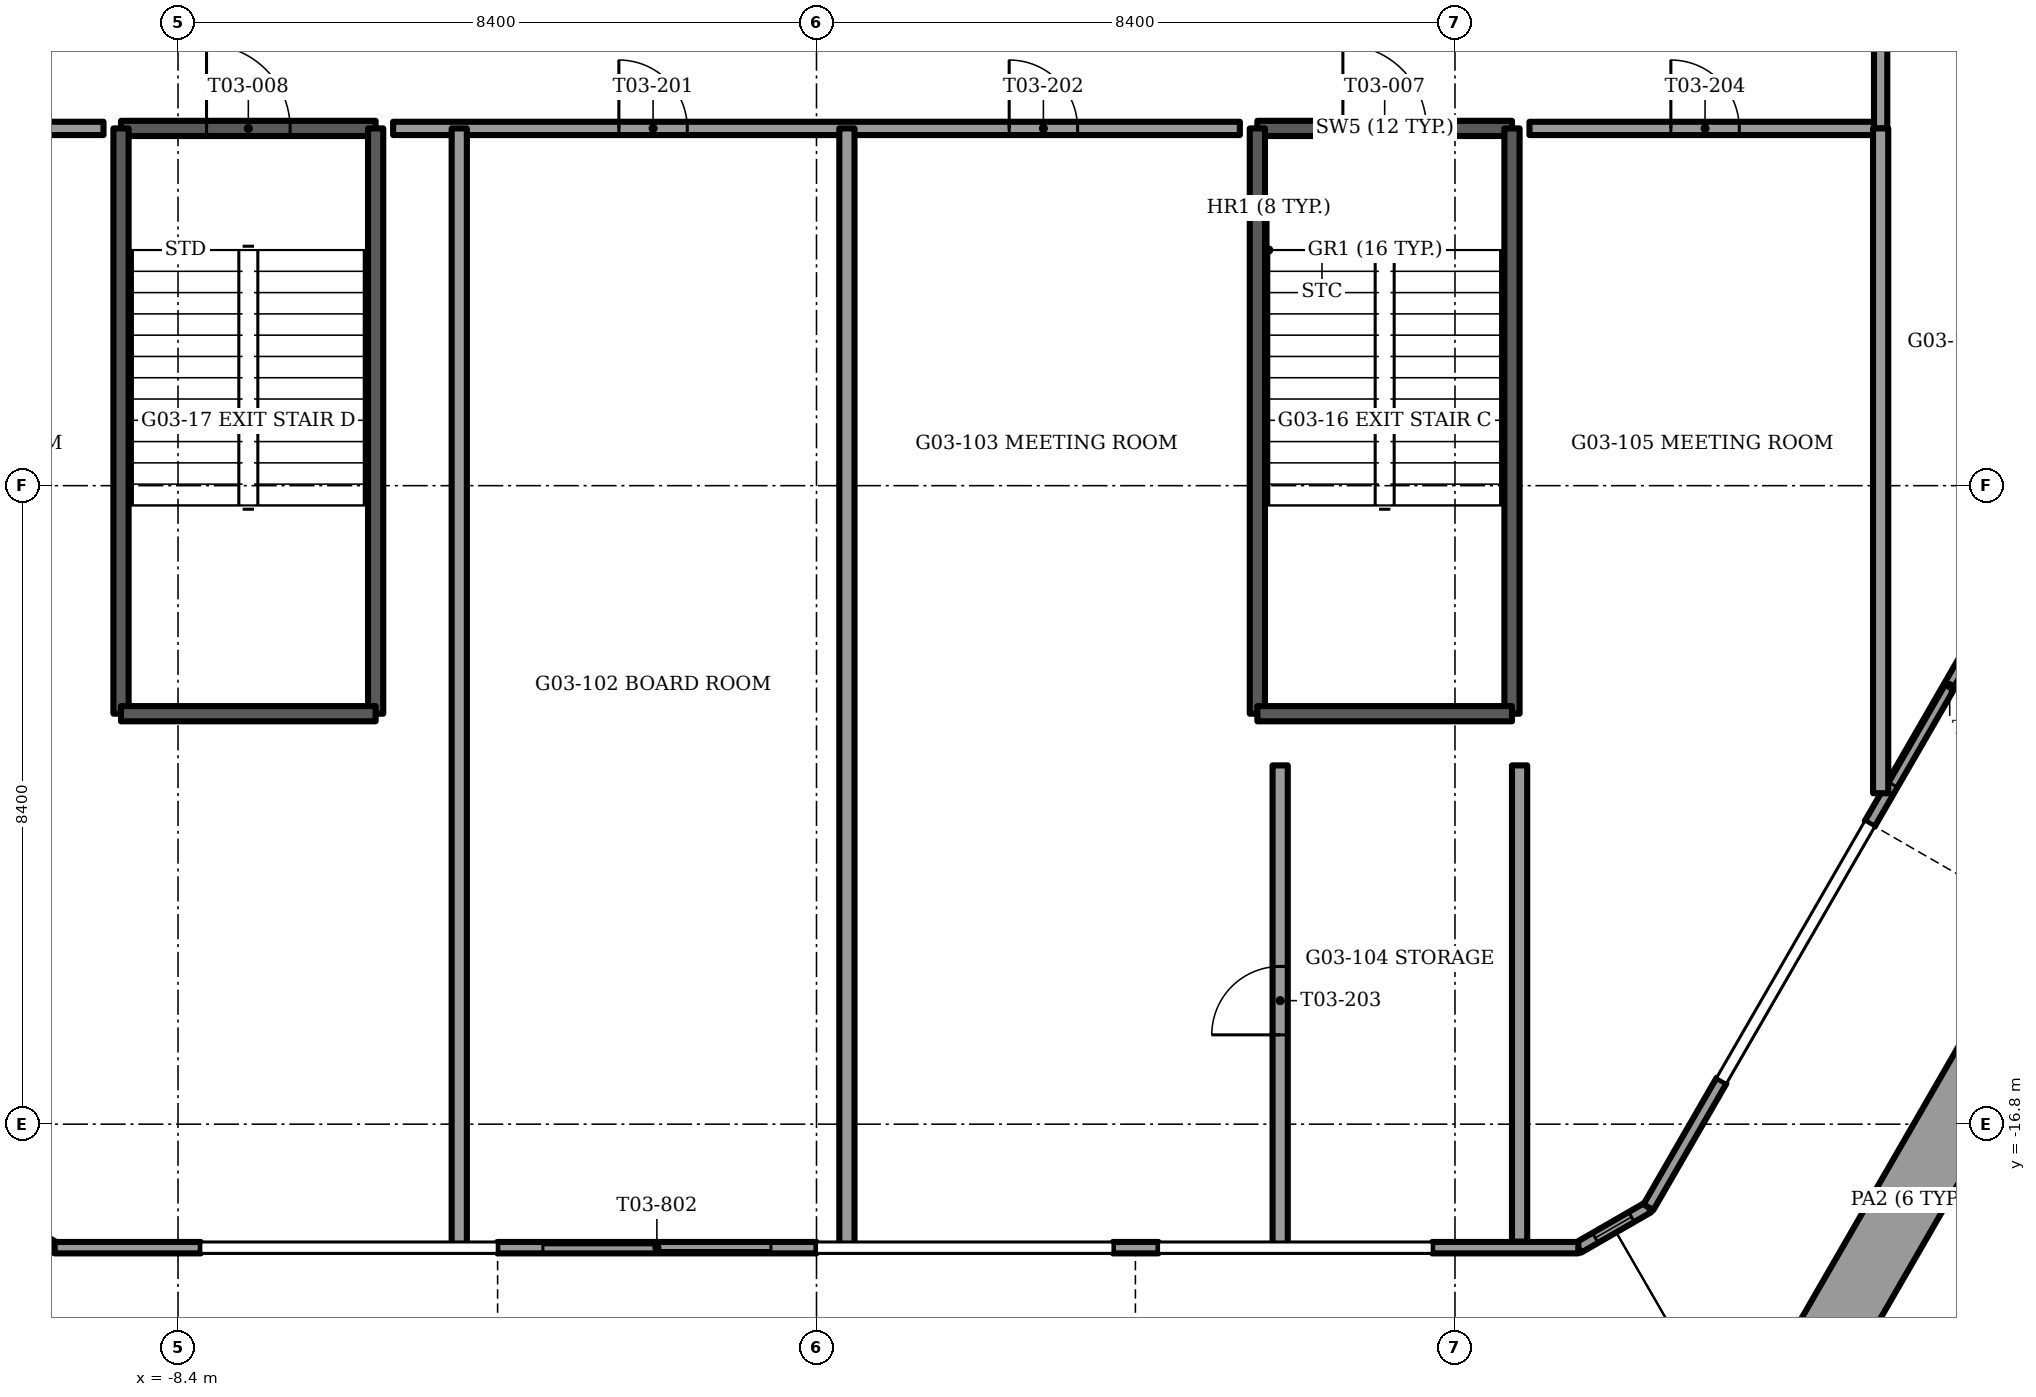
"""IFC4 building model, lengths in metres.
Left out: names, types, materials, properties, quantities, classifications, styles, units other than length and angle.
Written with IfcOpenShell. Run it as: python <this file> out.ifc"""

import sys

from ifc_helpers import new_model, si_unit, direction, frame, frame_2d, origin, place, context, subcontext, project, spatial, rectangle, extrude, element, fill, save


model = new_model("IFC4")
c1 = context("Model", 3, precision=1e-05, world=origin(), true_north=direction((0.0, 1.0)))
c2 = subcontext(c1, "Body", "Model", "MODEL_VIEW")
j1 = project(units=[si_unit("LENGTHUNIT", "METRE"), si_unit("PLANEANGLEUNIT", "RADIAN")], contexts=[c1])
p1 = place(None, origin())
s1 = spatial("IfcSite", under=j1, at=p1, CompositionType="ELEMENT")
p2 = place(p1, origin())
s2 = spatial("IfcBuilding", under=s1, at=p2, CompositionType="ELEMENT")
p3 = place(p2, frame((0.0, 0.0, 14.5)))
s3 = spatial("IfcBuildingStorey", under=s2, at=p3, CompositionType="ELEMENT", Elevation=14.5)
p4 = place(p3, frame((12.705, -20.694, 0.0), z_axis=(0.0, 0.0, 1.0), x_axis=(0.500005133765, 0.866022439784, 0.0)))
e1 = element("IfcWall", 1, at=p4, inside=s3, PredefinedType="PARAPET", context=c2, shape_type="SweptSolid", body=[
    extrude(rectangle(XDim=6.704, YDim=0.9, at=frame_2d((3.352, 0.0))), origin(), (0.0, 0.0, 1.0), 1.1),
])
p5 = place(p3, frame((-4.2, -18.425, 0.0), z_axis=(0.0, 0.0, 1.0), x_axis=(1.0, 0.0, 0.0)))
e2 = element("IfcWall", 2, at=p5, inside=s3, PredefinedType="SOLIDWALL", context=c2, shape_type="SweptSolid", body=[
    extrude(rectangle(XDim=4.2, YDim=0.15, at=frame_2d((2.1, 0.0))), origin(), (0.0, 0.0, 1.0), 4.2),
])
p6 = place(p5, frame((0.6, 0.0, 0.0)))
e3 = element("IfcOpeningElement", 3, at=p6, cuts=e2, PredefinedType="OPENING", context=c2, shape_type="SweptSolid", body=[
    extrude(rectangle(XDim=3.0, YDim=2.4, at=frame_2d((1.5, 1.2))), frame((0.0, 0.075, 0.0), z_axis=(0.0, -1.0, 0.0), x_axis=(1.0, 0.0, 0.0)), (0.0, 0.0, 1.0), 0.15),
])
for number, where, z_axis, x_axis in (
    (4, (-10.023, -18.425, 0.0), (0.0, 0.0, 1.0), (1.0, 0.0, 0.0)),
    (5, (8.1, -18.425, 0.0), (0.0, 0.0, 1.0), (1.0, 0.0, 0.0)),
):
    element("IfcWall", number, at=place(p3, frame(where, z_axis=z_axis, x_axis=x_axis)), inside=s3, PredefinedType="SOLIDWALL", context=c2, shape_type="SweptSolid", body=[
        extrude(rectangle(XDim=1.923, YDim=0.15, at=frame_2d((0.961, 0.0))), origin(), (0.0, 0.0, 1.0), 4.2),
    ])
p7 = place(p3, frame((3.9, -18.425, 0.0), z_axis=(0.0, 0.0, 1.0), x_axis=(1.0, 0.0, 0.0)))
e6 = element("IfcWall", 6, at=p7, inside=s3, PredefinedType="SOLIDWALL", context=c2, shape_type="SweptSolid", body=[
    extrude(rectangle(XDim=0.6, YDim=0.15, at=frame_2d((0.3, 0.0))), origin(), (0.0, 0.0, 1.0), 4.2),
])
p8 = place(p3, frame((13.856, -12.85, 0.0), z_axis=(0.0, 0.0, 1.0), x_axis=(0.500002543286, 0.866023935413, 0.0)))
e7 = element("IfcWall", 7, at=p8, inside=s3, PredefinedType="SOLIDWALL", context=c2, shape_type="SweptSolid", body=[
    extrude(rectangle(XDim=4.2, YDim=0.15, at=frame_2d((2.1, 0.0))), origin(), (0.0, 0.0, 1.0), 4.2),
])
p9 = place(p8, frame((0.6, 0.0, 0.0)))
e8 = element("IfcOpeningElement", 8, at=p9, cuts=e7, PredefinedType="OPENING", context=c2, shape_type="SweptSolid", body=[
    extrude(rectangle(XDim=3.0, YDim=2.4, at=frame_2d((1.5, 1.2))), frame((0.0, 0.075, 0.0), z_axis=(0.0, -1.0, 0.0), x_axis=(1.0, 0.0, 0.0)), (0.0, 0.0, 1.0), 0.15),
])
p10 = place(p3, frame((10.945, -17.893, 0.0), z_axis=(0.0, 0.0, 1.0), x_axis=(0.499989888488, 0.86603124159, 0.0)))
e9 = element("IfcWall", 9, at=p10, inside=s3, PredefinedType="SOLIDWALL", context=c2, shape_type="SweptSolid", body=[
    extrude(rectangle(XDim=1.923, YDim=0.15, at=frame_2d((0.961, 0.0))), origin(), (0.0, 0.0, 1.0), 4.2),
])
p11 = place(p3, frame((-10.945, -17.893, 0.0), z_axis=(0.0, 0.0, 1.0), x_axis=(0.866048165231, -0.499960573946, 0.0)))
e10 = element("IfcWall", 10, at=p11, inside=s3, PredefinedType="SOLIDWALL", context=c2, shape_type="SweptSolid", body=[
    extrude(rectangle(XDim=1.065, YDim=0.15, at=frame_2d((0.532, 0.0))), origin(), (0.0, 0.0, 1.0), 4.2),
])
p12 = place(p11, frame((0.258, 0.0, 0.15)))
e11 = element("IfcOpeningElement", 11, at=p12, cuts=e10, PredefinedType="OPENING", context=c2, shape_type="SweptSolid", body=[
    extrude(rectangle(XDim=0.55, YDim=3.6, at=frame_2d((0.275, 1.8))), frame((0.0, 0.075, 0.0), z_axis=(0.0, -1.0, 0.0), x_axis=(1.0, 0.0, 0.0)), (0.0, 0.0, 1.0), 0.15),
])
p13 = place(p3, frame((10.023, -18.425, 0.0), z_axis=(0.0, 0.0, 1.0), x_axis=(0.866048165231, 0.499960573946, 0.0)))
e12 = element("IfcWall", 12, at=p13, inside=s3, PredefinedType="SOLIDWALL", context=c2, shape_type="SweptSolid", body=[
    extrude(rectangle(XDim=1.065, YDim=0.15, at=frame_2d((0.532, 0.0))), origin(), (0.0, 0.0, 1.0), 4.2),
])
p14 = place(p13, frame((0.258, 0.0, 0.15)))
e13 = element("IfcOpeningElement", 13, at=p14, cuts=e12, PredefinedType="OPENING", context=c2, shape_type="SweptSolid", body=[
    extrude(rectangle(XDim=0.55, YDim=3.6, at=frame_2d((0.275, 1.8))), frame((0.0, 0.075, 0.0), z_axis=(0.0, -1.0, 0.0), x_axis=(1.0, 0.0, 0.0)), (0.0, 0.0, 1.0), 0.15),
])
p15 = place(p3, frame((5.8, -3.7, -0.3), z_axis=(0.0, 0.0, 1.0), x_axis=(1.0, 0.0, 0.0)))
e14 = element("IfcWall", 14, at=p15, inside=s3, PredefinedType="SOLIDWALL", context=c2, shape_type="SweptSolid", body=[
    extrude(rectangle(XDim=3.35, YDim=0.2, at=frame_2d((1.675, 0.0))), origin(), (0.0, 0.0, 1.0), 4.5),
])
p16 = place(p15, frame((1.125, 0.0, 0.0)))
e15 = element("IfcOpeningElement", 15, at=p16, cuts=e14, PredefinedType="OPENING", context=c2, shape_type="SweptSolid", body=[
    extrude(rectangle(XDim=1.1, YDim=2.1, at=frame_2d((0.55, 1.05))), frame((0.0, 0.1, 0.0), z_axis=(0.0, -1.0, 0.0), x_axis=(1.0, 0.0, 0.0)), (0.0, 0.0, 1.0), 0.2),
])
for number, where, z_axis, x_axis in (
    (16, (5.8, -3.7, -0.3), (0.0, 0.0, 1.0), (0.0, -1.0, 0.0)),
    (17, (9.15, -3.7, -0.3), (0.0, 0.0, 1.0), (0.0, -1.0, 0.0)),
):
    element("IfcWall", number, at=place(p3, frame(where, z_axis=z_axis, x_axis=x_axis)), inside=s3, PredefinedType="SOLIDWALL", context=c2, shape_type="SweptSolid", body=[
        extrude(rectangle(XDim=7.7, YDim=0.2, at=frame_2d((3.85, 0.0))), origin(), (0.0, 0.0, 1.0), 4.5),
    ])
p17 = place(p3, frame((5.8, -11.4, -0.3), z_axis=(0.0, 0.0, 1.0), x_axis=(1.0, 0.0, 0.0)))
e18 = element("IfcWall", 18, at=p17, inside=s3, PredefinedType="SOLIDWALL", context=c2, shape_type="SweptSolid", body=[
    extrude(rectangle(XDim=3.35, YDim=0.2, at=frame_2d((1.675, 0.0))), origin(), (0.0, 0.0, 1.0), 4.5),
])
p18 = place(p3, frame((-9.15, -3.7, -0.3), z_axis=(0.0, 0.0, 1.0), x_axis=(1.0, 0.0, 0.0)))
e19 = element("IfcWall", 19, at=p18, inside=s3, PredefinedType="SOLIDWALL", context=c2, shape_type="SweptSolid", body=[
    extrude(rectangle(XDim=3.35, YDim=0.2, at=frame_2d((1.675, 0.0))), origin(), (0.0, 0.0, 1.0), 4.5),
])
p19 = place(p18, frame((1.125, 0.0, 0.0)))
e20 = element("IfcOpeningElement", 20, at=p19, cuts=e19, PredefinedType="OPENING", context=c2, shape_type="SweptSolid", body=[
    extrude(rectangle(XDim=1.1, YDim=2.1, at=frame_2d((0.55, 1.05))), frame((0.0, 0.1, 0.0), z_axis=(0.0, -1.0, 0.0), x_axis=(1.0, 0.0, 0.0)), (0.0, 0.0, 1.0), 0.2),
])
for number, where, z_axis, x_axis in (
    (21, (-9.15, -3.7, -0.3), (0.0, 0.0, 1.0), (0.0, -1.0, 0.0)),
    (22, (-5.8, -3.7, -0.3), (0.0, 0.0, 1.0), (0.0, -1.0, 0.0)),
):
    element("IfcWall", number, at=place(p3, frame(where, z_axis=z_axis, x_axis=x_axis)), inside=s3, PredefinedType="SOLIDWALL", context=c2, shape_type="SweptSolid", body=[
        extrude(rectangle(XDim=7.7, YDim=0.2, at=frame_2d((3.85, 0.0))), origin(), (0.0, 0.0, 1.0), 4.5),
    ])
p20 = place(p3, frame((-9.15, -11.4, -0.3), z_axis=(0.0, 0.0, 1.0), x_axis=(1.0, 0.0, 0.0)))
e23 = element("IfcWall", 23, at=p20, inside=s3, PredefinedType="SOLIDWALL", context=c2, shape_type="SweptSolid", body=[
    extrude(rectangle(XDim=3.35, YDim=0.2, at=frame_2d((1.675, 0.0))), origin(), (0.0, 0.0, 1.0), 4.5),
])
p21 = place(p3, frame((-19.118, -3.7, 0.0), z_axis=(0.0, 0.0, 1.0), x_axis=(1.0, 0.0, 0.0)))
e24 = element("IfcWall", 24, at=p21, inside=s3, PredefinedType="PARTITIONING", context=c2, shape_type="SweptSolid", body=[
    extrude(rectangle(XDim=9.738, YDim=0.175, at=frame_2d((4.869, 0.0))), origin(), (0.0, 0.0, 1.0), 4.2),
])
p22 = place(p21, frame((6.978, 0.0, 0.0)))
e25 = element("IfcOpeningElement", 25, at=p22, cuts=e24, PredefinedType="OPENING", context=c2, shape_type="SweptSolid", body=[
    extrude(rectangle(XDim=0.9, YDim=2.1, at=frame_2d((0.45, 1.05))), frame((0.0, 0.087, 0.0), z_axis=(0.0, -1.0, 0.0), x_axis=(1.0, 0.0, 0.0)), (0.0, 0.0, 1.0), 0.175),
])
p23 = place(p21, frame((2.188, 0.0, 0.0)))
e26 = element("IfcOpeningElement", 26, at=p23, cuts=e24, PredefinedType="OPENING", context=c2, shape_type="SweptSolid", body=[
    extrude(rectangle(XDim=0.9, YDim=2.1, at=frame_2d((0.45, 1.05))), frame((0.0, 0.087, 0.0), z_axis=(0.0, -1.0, 0.0), x_axis=(1.0, 0.0, 0.0)), (0.0, 0.0, 1.0), 0.175),
])
p24 = place(p3, frame((-5.57, -3.7, 0.0), z_axis=(0.0, 0.0, 1.0), x_axis=(1.0, 0.0, 0.0)))
e27 = element("IfcWall", 27, at=p24, inside=s3, PredefinedType="PARTITIONING", context=c2, shape_type="SweptSolid", body=[
    extrude(rectangle(XDim=11.14, YDim=0.175, at=frame_2d((5.57, 0.0))), origin(), (0.0, 0.0, 1.0), 4.2),
])
p25 = place(p24, frame((2.97, 0.0, 0.0)))
e28 = element("IfcOpeningElement", 28, at=p25, cuts=e27, PredefinedType="OPENING", context=c2, shape_type="SweptSolid", body=[
    extrude(rectangle(XDim=0.9, YDim=2.1, at=frame_2d((0.45, 1.05))), frame((0.0, 0.087, 0.0), z_axis=(0.0, -1.0, 0.0), x_axis=(1.0, 0.0, 0.0)), (0.0, 0.0, 1.0), 0.175),
])
p26 = place(p24, frame((8.105, 0.0, 0.0)))
e29 = element("IfcOpeningElement", 29, at=p26, cuts=e27, PredefinedType="OPENING", context=c2, shape_type="SweptSolid", body=[
    extrude(rectangle(XDim=0.9, YDim=2.1, at=frame_2d((0.45, 1.05))), frame((0.0, 0.087, 0.0), z_axis=(0.0, -1.0, 0.0), x_axis=(1.0, 0.0, 0.0)), (0.0, 0.0, 1.0), 0.175),
])
p27 = place(p3, frame((9.38, -3.7, 0.0), z_axis=(0.0, 0.0, 1.0), x_axis=(1.0, 0.0, 0.0)))
e30 = element("IfcWall", 30, at=p27, inside=s3, PredefinedType="PARTITIONING", context=c2, shape_type="SweptSolid", body=[
    extrude(rectangle(XDim=4.62, YDim=0.175, at=frame_2d((2.31, 0.0))), origin(), (0.0, 0.0, 1.0), 4.2),
])
p28 = place(p27, frame((1.86, 0.0, 0.0)))
e31 = element("IfcOpeningElement", 31, at=p28, cuts=e30, PredefinedType="OPENING", context=c2, shape_type="SweptSolid", body=[
    extrude(rectangle(XDim=0.9, YDim=2.1, at=frame_2d((0.45, 1.05))), frame((0.0, 0.087, 0.0), z_axis=(0.0, -1.0, 0.0), x_axis=(1.0, 0.0, 0.0)), (0.0, 0.0, 1.0), 0.175),
])
p29 = place(p3, frame((14.0, -3.7, 0.0), z_axis=(0.0, 0.0, 1.0), x_axis=(0.0, 1.0, 0.0)))
e32 = element("IfcWall", 32, at=p29, inside=s3, PredefinedType="PARTITIONING", context=c2, shape_type="SweptSolid", body=[
    extrude(rectangle(XDim=10.6, YDim=0.175, at=frame_2d((5.3, 0.0))), origin(), (0.0, 0.0, 1.0), 4.2),
])
p30 = place(p29, frame((2.05, 0.0, 0.0)))
e33 = element("IfcOpeningElement", 33, at=p30, cuts=e32, PredefinedType="OPENING", context=c2, shape_type="SweptSolid", body=[
    extrude(rectangle(XDim=0.9, YDim=2.1, at=frame_2d((0.45, 1.05))), frame((0.0, 0.087, 0.0), z_axis=(0.0, -1.0, 0.0), x_axis=(1.0, 0.0, 0.0)), (0.0, 0.0, 1.0), 0.175),
])
p31 = place(p29, frame((7.35, 0.0, 0.0)))
e34 = element("IfcOpeningElement", 34, at=p31, cuts=e32, PredefinedType="OPENING", context=c2, shape_type="SweptSolid", body=[
    extrude(rectangle(XDim=0.9, YDim=2.1, at=frame_2d((0.45, 1.05))), frame((0.0, 0.087, 0.0), z_axis=(0.0, -1.0, 0.0), x_axis=(1.0, 0.0, 0.0)), (0.0, 0.0, 1.0), 0.175),
])
for number, where, z_axis, x_axis in (
    (35, (-4.7, -18.406, 0.0), (0.0, 0.0, 1.0), (0.0, 1.0, 0.0)),
    (36, (0.4, -18.406, 0.0), (0.0, 0.0, 1.0), (0.0, 1.0, 0.0)),
):
    element("IfcWall", number, at=place(p3, frame(where, z_axis=z_axis, x_axis=x_axis)), inside=s3, PredefinedType="PARTITIONING", context=c2, shape_type="SweptSolid", body=[
        extrude(rectangle(XDim=14.706, YDim=0.2, at=frame_2d((7.353, 0.0))), origin(), (0.0, 0.0, 1.0), 4.2),
    ])
p32 = place(p3, frame((6.1, -18.406, 0.0), z_axis=(0.0, 0.0, 1.0), x_axis=(0.0, 1.0, 0.0)))
e37 = element("IfcWall", 37, at=p32, inside=s3, PredefinedType="PARTITIONING", context=c2, shape_type="SweptSolid", body=[
    extrude(rectangle(XDim=6.326, YDim=0.2, at=frame_2d((3.163, 0.0))), origin(), (0.0, 0.0, 1.0), 4.2),
])
p33 = place(p32, frame((2.781, 0.0, 0.0)))
e38 = element("IfcOpeningElement", 38, at=p33, cuts=e37, PredefinedType="OPENING", context=c2, shape_type="SweptSolid", body=[
    extrude(rectangle(XDim=0.9, YDim=2.1, at=frame_2d((0.45, 1.05))), frame((0.0, 0.1, 0.0), z_axis=(0.0, -1.0, 0.0), x_axis=(1.0, 0.0, 0.0)), (0.0, 0.0, 1.0), 0.2),
])
p34 = place(p3, frame((9.25, -18.345, 0.0), z_axis=(0.0, 0.0, 1.0), x_axis=(0.0, 1.0, 0.0)))
e39 = element("IfcWall", 39, at=p34, inside=s3, PredefinedType="PARTITIONING", context=c2, shape_type="SweptSolid", body=[
    extrude(rectangle(XDim=6.265, YDim=0.2, at=frame_2d((3.132, 0.0))), origin(), (0.0, 0.0, 1.0), 4.2),
])
p35 = place(p3, frame((14.0, -12.446, 0.0), z_axis=(0.0, 0.0, 1.0), x_axis=(0.0, 1.0, 0.0)))
e40 = element("IfcWall", 40, at=p35, inside=s3, PredefinedType="PARTITIONING", context=c2, shape_type="SweptSolid", body=[
    extrude(rectangle(XDim=8.746, YDim=0.2, at=frame_2d((4.373, 0.0))), origin(), (0.0, 0.0, 1.0), 4.2),
])
p36 = place(p6, origin())
e41 = element("IfcDoor", 41, at=p36, inside=s3, OperationType="SLIDING_TO_RIGHT", PredefinedType="DOOR", context=c2, shape_type="SweptSolid", body=[
    extrude(rectangle(XDim=3.0, YDim=2.4, at=frame_2d((1.5, 1.2))), frame((0.0, 0.025, 0.0), z_axis=(0.0, -1.0, 0.0), x_axis=(1.0, 0.0, 0.0)), (0.0, 0.0, 1.0), 0.05),
])
fill(e3, e41)
p37 = place(p9, origin())
e42 = element("IfcDoor", 42, at=p37, inside=s3, OperationType="SLIDING_TO_RIGHT", PredefinedType="DOOR", context=c2, shape_type="SweptSolid", body=[
    extrude(rectangle(XDim=3.0, YDim=2.4, at=frame_2d((1.5, 1.2))), frame((0.0, 0.025, 0.0), z_axis=(0.0, -1.0, 0.0), x_axis=(1.0, 0.0, 0.0)), (0.0, 0.0, 1.0), 0.05),
])
fill(e8, e42)
p38 = place(p14, origin())
e43 = element("IfcWindow", 43, at=p38, inside=s3, PartitioningType="SINGLE_PANEL", PredefinedType="WINDOW", context=c2, shape_type="SweptSolid", body=[
    extrude(rectangle(XDim=0.55, YDim=3.6, at=frame_2d((0.275, 1.8))), frame((0.0, 0.03, 0.0), z_axis=(0.0, -1.0, 0.0), x_axis=(1.0, 0.0, 0.0)), (0.0, 0.0, 1.0), 0.06),
])
fill(e13, e43)
p39 = place(p16, origin())
e44 = element("IfcDoor", 44, at=p39, inside=s3, OperationType="SINGLE_SWING_LEFT", PredefinedType="DOOR", context=c2, shape_type="SweptSolid", body=[
    extrude(rectangle(XDim=1.1, YDim=2.1, at=frame_2d((0.55, 1.05))), frame((0.0, 0.025, 0.0), z_axis=(0.0, -1.0, 0.0), x_axis=(1.0, 0.0, 0.0)), (0.0, 0.0, 1.0), 0.05),
])
fill(e15, e44)
p40 = place(p19, origin())
e45 = element("IfcDoor", 45, at=p40, inside=s3, OperationType="SINGLE_SWING_LEFT", PredefinedType="DOOR", context=c2, shape_type="SweptSolid", body=[
    extrude(rectangle(XDim=1.1, YDim=2.1, at=frame_2d((0.55, 1.05))), frame((0.0, 0.025, 0.0), z_axis=(0.0, -1.0, 0.0), x_axis=(1.0, 0.0, 0.0)), (0.0, 0.0, 1.0), 0.05),
])
fill(e20, e45)
p41 = place(p25, origin())
e46 = element("IfcDoor", 46, at=p41, inside=s3, OperationType="SINGLE_SWING_LEFT", PredefinedType="DOOR", context=c2, shape_type="SweptSolid", body=[
    extrude(rectangle(XDim=0.9, YDim=2.1, at=frame_2d((0.45, 1.05))), frame((0.0, 0.025, 0.0), z_axis=(0.0, -1.0, 0.0), x_axis=(1.0, 0.0, 0.0)), (0.0, 0.0, 1.0), 0.05),
])
fill(e28, e46)
p42 = place(p26, origin())
e47 = element("IfcDoor", 47, at=p42, inside=s3, OperationType="SINGLE_SWING_RIGHT", PredefinedType="DOOR", context=c2, shape_type="SweptSolid", body=[
    extrude(rectangle(XDim=0.9, YDim=2.1, at=frame_2d((0.45, 1.05))), frame((0.0, 0.025, 0.0), z_axis=(0.0, -1.0, 0.0), x_axis=(1.0, 0.0, 0.0)), (0.0, 0.0, 1.0), 0.05),
])
fill(e29, e47)
p43 = place(p33, origin())
e48 = element("IfcDoor", 48, at=p43, inside=s3, OperationType="SINGLE_SWING_LEFT", PredefinedType="DOOR", context=c2, shape_type="SweptSolid", body=[
    extrude(rectangle(XDim=0.9, YDim=2.1, at=frame_2d((0.45, 1.05))), frame((0.0, 0.025, 0.0), z_axis=(0.0, -1.0, 0.0), x_axis=(1.0, 0.0, 0.0)), (0.0, 0.0, 1.0), 0.05),
])
fill(e38, e48)
p44 = place(p28, origin())
e49 = element("IfcDoor", 49, at=p44, inside=s3, OperationType="SINGLE_SWING_RIGHT", PredefinedType="DOOR", context=c2, shape_type="SweptSolid", body=[
    extrude(rectangle(XDim=0.9, YDim=2.1, at=frame_2d((0.45, 1.05))), frame((0.0, 0.025, 0.0), z_axis=(0.0, -1.0, 0.0), x_axis=(1.0, 0.0, 0.0)), (0.0, 0.0, 1.0), 0.05),
])
fill(e31, e49)
save(model, sys.argv[1])
